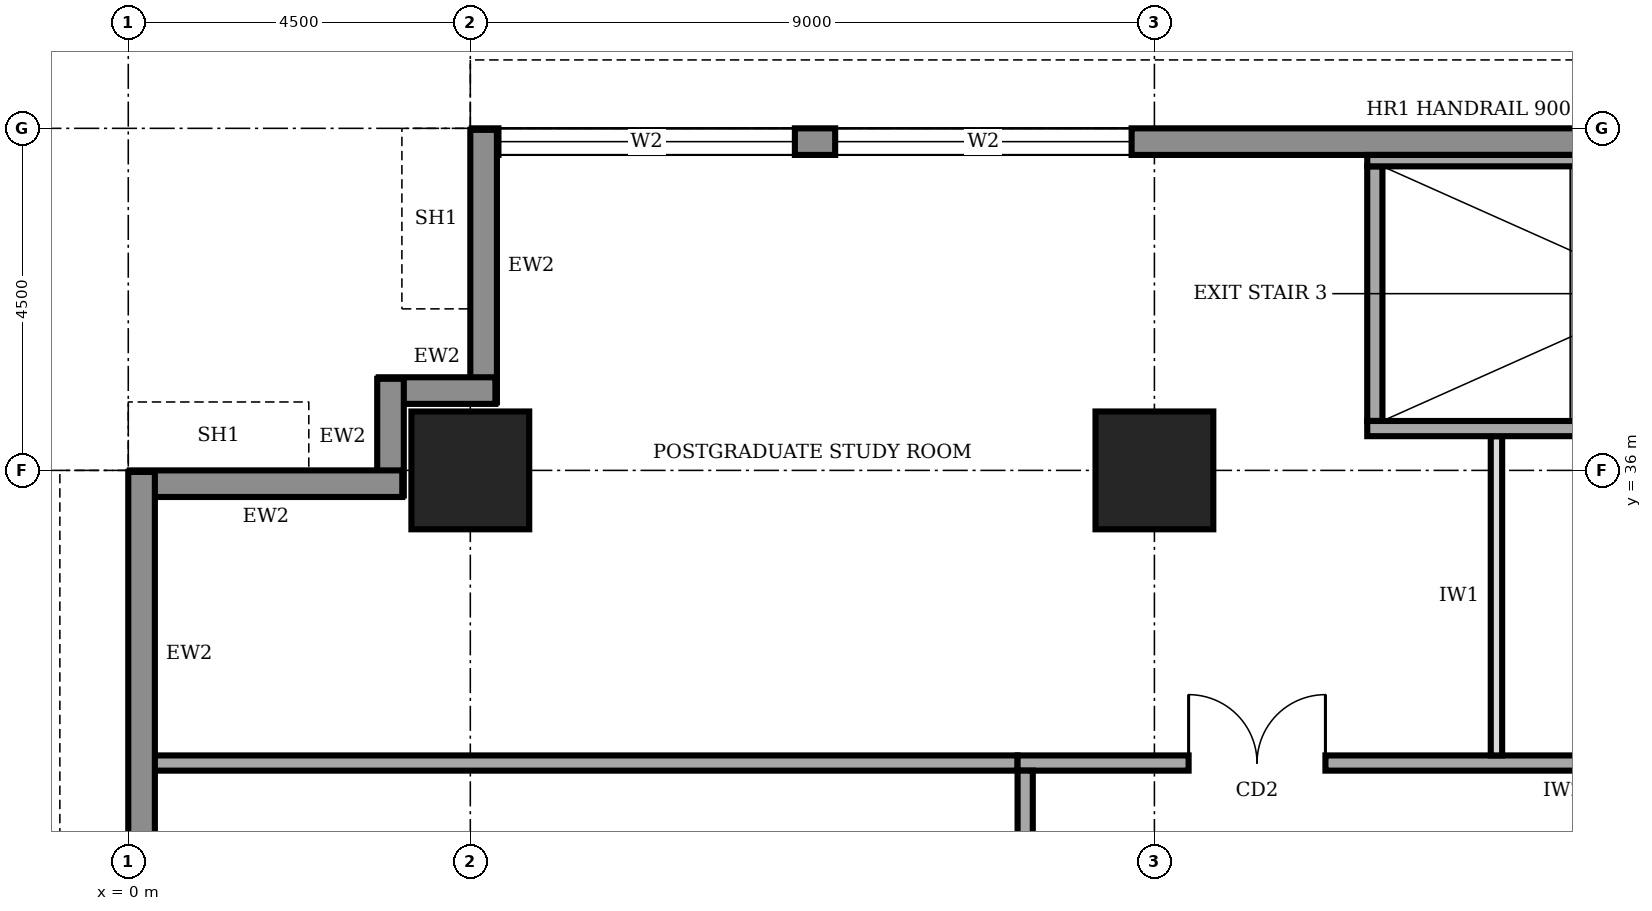
"""IFC4 building model, lengths in metres.
Left out: names, types, materials, properties, quantities, classifications, styles, units other than length and angle.
Written with IfcOpenShell. Run it as: python <this file> out.ifc"""

import sys

from ifc_helpers import new_model, si_unit, direction, frame, frame_2d, origin, origin_2d, place, context, subcontext, project, spatial, rectangle, extrude, element, fill, save


model = new_model("IFC4")
c1 = context("Model", 3, precision=1e-05, world=origin(), true_north=direction((0.0, 1.0)))
c2 = subcontext(c1, "Body", "Model", "MODEL_VIEW")
j1 = project(units=[si_unit("LENGTHUNIT", "METRE"), si_unit("PLANEANGLEUNIT", "RADIAN")], contexts=[c1])
p1 = place(None, origin())
s1 = spatial("IfcSite", under=j1, at=p1, CompositionType="ELEMENT")
p2 = place(p1, origin())
s2 = spatial("IfcBuilding", under=s1, at=p2, CompositionType="ELEMENT")
p3 = place(p2, frame((0.0, 0.0, 229.0)))
s3 = spatial("IfcBuildingStorey", under=s2, at=p3, CompositionType="ELEMENT", Elevation=229.0)
for number, where, z_axis, x_axis in (
    (1, (4.5, 36.0, 0.0), (0.0, 0.0, 1.0), (1.0, 0.0, 0.0)),
    (2, (13.5, 36.0, 0.0), (0.0, 0.0, 1.0), (1.0, 0.0, 0.0)),
):
    element("IfcColumn", number, at=place(p3, frame(where, z_axis=z_axis, x_axis=x_axis)), inside=s3, PredefinedType="COLUMN", context=c2, shape_type="SweptSolid", body=[
        extrude(rectangle(XDim=1.55, YDim=1.55, at=origin_2d()), origin(), (0.0, 0.0, 1.0), 4.0),
    ])
p4 = place(p3, frame((35.98, 40.325, 0.0), z_axis=(0.0, 0.0, 1.0), x_axis=(-1.0, 0.0, 0.0)))
e3 = element("IfcWall", 3, at=p4, inside=s3, PredefinedType="STANDARD", context=c2, shape_type="SweptSolid", body=[
    extrude(rectangle(XDim=31.46, YDim=0.35, at=frame_2d((15.73, 0.0))), origin(), (0.0, 0.0, 1.0), 3.75),
])
p5 = place(p4, frame((27.21, 0.0, 0.6)))
e4 = element("IfcOpeningElement", 4, at=p5, cuts=e3, PredefinedType="OPENING", context=c2, shape_type="SweptSolid", body=[
    extrude(rectangle(XDim=3.9, YDim=2.6, at=frame_2d((1.95, 1.3))), frame((0.0, 0.185, 0.0), z_axis=(0.0, -1.0, 0.0), x_axis=(1.0, 0.0, 0.0)), (0.0, 0.0, 1.0), 0.37),
])
p6 = place(p4, frame((22.78, 0.0, 0.6)))
e5 = element("IfcOpeningElement", 5, at=p6, cuts=e3, PredefinedType="OPENING", context=c2, shape_type="SweptSolid", body=[
    extrude(rectangle(XDim=3.9, YDim=2.6, at=frame_2d((1.95, 1.3))), frame((0.0, 0.185, 0.0), z_axis=(0.0, -1.0, 0.0), x_axis=(1.0, 0.0, 0.0)), (0.0, 0.0, 1.0), 0.37),
])
p7 = place(p4, frame((4.78, 0.0, 0.6)))
e6 = element("IfcOpeningElement", 6, at=p7, cuts=e3, PredefinedType="OPENING", context=c2, shape_type="SweptSolid", body=[
    extrude(rectangle(XDim=3.9, YDim=2.6, at=frame_2d((1.95, 1.3))), frame((0.0, 0.185, 0.0), z_axis=(0.0, -1.0, 0.0), x_axis=(1.0, 0.0, 0.0)), (0.0, 0.0, 1.0), 0.37),
])
p8 = place(p3, frame((4.675, 40.48, 0.0), z_axis=(0.0, 0.0, 1.0), x_axis=(0.0, -1.0, 0.0)))
e7 = element("IfcWall", 7, at=p8, inside=s3, PredefinedType="STANDARD", context=c2, shape_type="SweptSolid", body=[
    extrude(rectangle(XDim=3.585, YDim=0.35, at=frame_2d((1.792, 0.0))), origin(), (0.0, 0.0, 1.0), 2.85),
])
for number, where, z_axis, x_axis in (
    (8, (4.83, 37.05, 0.0), (0.0, 0.0, 1.0), (-1.0, 0.0, 0.0)),
    (9, (3.45, 37.205, 0.0), (0.0, 0.0, 1.0), (0.0, -1.0, 0.0)),
):
    element("IfcWall", number, at=place(p3, frame(where, z_axis=z_axis, x_axis=x_axis)), inside=s3, PredefinedType="STANDARD", context=c2, shape_type="SweptSolid", body=[
        extrude(rectangle(XDim=1.535, YDim=0.35, at=frame_2d((0.768, 0.0))), origin(), (0.0, 0.0, 1.0), 3.75),
    ])
p9 = place(p3, frame((3.605, 35.825, 0.0), z_axis=(0.0, 0.0, 1.0), x_axis=(-1.0, 0.0, 0.0)))
e10 = element("IfcWall", 10, at=p9, inside=s3, PredefinedType="STANDARD", context=c2, shape_type="SweptSolid", body=[
    extrude(rectangle(XDim=3.585, YDim=0.35, at=frame_2d((1.792, 0.0))), origin(), (0.0, 0.0, 1.0), 2.85),
])
p10 = place(p3, frame((0.175, 35.98, 0.0), z_axis=(0.0, 0.0, 1.0), x_axis=(0.0, -1.0, 0.0)))
e11 = element("IfcWall", 11, at=p10, inside=s3, PredefinedType="STANDARD", context=c2, shape_type="SweptSolid", body=[
    extrude(rectangle(XDim=31.46, YDim=0.35, at=frame_2d((15.73, 0.0))), origin(), (0.0, 0.0, 1.0), 3.75),
])
p11 = place(p10, frame((27.21, 0.0, 0.6)))
e12 = element("IfcOpeningElement", 12, at=p11, cuts=e11, PredefinedType="OPENING", context=c2, shape_type="SweptSolid", body=[
    extrude(rectangle(XDim=3.9, YDim=2.6, at=frame_2d((1.95, 1.3))), frame((0.0, 0.185, 0.0), z_axis=(0.0, -1.0, 0.0), x_axis=(1.0, 0.0, 0.0)), (0.0, 0.0, 1.0), 0.37),
])
p12 = place(p10, frame((22.78, 0.0, 0.6)))
e13 = element("IfcOpeningElement", 13, at=p12, cuts=e11, PredefinedType="OPENING", context=c2, shape_type="SweptSolid", body=[
    extrude(rectangle(XDim=3.9, YDim=2.6, at=frame_2d((1.95, 1.3))), frame((0.0, 0.185, 0.0), z_axis=(0.0, -1.0, 0.0), x_axis=(1.0, 0.0, 0.0)), (0.0, 0.0, 1.0), 0.37),
])
p13 = place(p10, frame((18.28, 0.0, 0.6)))
e14 = element("IfcOpeningElement", 14, at=p13, cuts=e11, PredefinedType="OPENING", context=c2, shape_type="SweptSolid", body=[
    extrude(rectangle(XDim=3.9, YDim=2.6, at=frame_2d((1.95, 1.3))), frame((0.0, 0.185, 0.0), z_axis=(0.0, -1.0, 0.0), x_axis=(1.0, 0.0, 0.0)), (0.0, 0.0, 1.0), 0.37),
])
p14 = place(p10, frame((13.78, 0.0, 0.6)))
e15 = element("IfcOpeningElement", 15, at=p14, cuts=e11, PredefinedType="OPENING", context=c2, shape_type="SweptSolid", body=[
    extrude(rectangle(XDim=3.9, YDim=2.6, at=frame_2d((1.95, 1.3))), frame((0.0, 0.185, 0.0), z_axis=(0.0, -1.0, 0.0), x_axis=(1.0, 0.0, 0.0)), (0.0, 0.0, 1.0), 0.37),
])
p15 = place(p10, frame((9.28, 0.0, 0.6)))
e16 = element("IfcOpeningElement", 16, at=p15, cuts=e11, PredefinedType="OPENING", context=c2, shape_type="SweptSolid", body=[
    extrude(rectangle(XDim=3.9, YDim=2.6, at=frame_2d((1.95, 1.3))), frame((0.0, 0.185, 0.0), z_axis=(0.0, -1.0, 0.0), x_axis=(1.0, 0.0, 0.0)), (0.0, 0.0, 1.0), 0.37),
])
p16 = place(p10, frame((4.78, 0.0, 0.6)))
e17 = element("IfcOpeningElement", 17, at=p16, cuts=e11, PredefinedType="OPENING", context=c2, shape_type="SweptSolid", body=[
    extrude(rectangle(XDim=3.9, YDim=2.6, at=frame_2d((1.95, 1.3))), frame((0.0, 0.185, 0.0), z_axis=(0.0, -1.0, 0.0), x_axis=(1.0, 0.0, 0.0)), (0.0, 0.0, 1.0), 0.37),
])
p17 = place(p3, frame((28.6, 32.15, 0.0), z_axis=(0.0, 0.0, 1.0), x_axis=(-1.0, 0.0, 0.0)))
e18 = element("IfcWall", 18, at=p17, inside=s3, PredefinedType="SOLIDWALL", context=c2, shape_type="SweptSolid", body=[
    extrude(rectangle(XDim=16.9, YDim=0.2, at=frame_2d((8.45, 0.0))), origin(), (0.0, 0.0, 1.0), 3.75),
])
p18 = place(p17, frame((12.85, 0.0, 0.0)))
e19 = element("IfcOpeningElement", 19, at=p18, cuts=e18, PredefinedType="OPENING", context=c2, shape_type="SweptSolid", body=[
    extrude(rectangle(XDim=1.8, YDim=2.1, at=frame_2d((0.9, 1.05))), frame((0.0, 0.11, 0.0), z_axis=(0.0, -1.0, 0.0), x_axis=(1.0, 0.0, 0.0)), (0.0, 0.0, 1.0), 0.22),
])
p19 = place(p17, frame((5.6, 0.0, 0.0)))
e20 = element("IfcOpeningElement", 20, at=p19, cuts=e18, PredefinedType="OPENING", context=c2, shape_type="SweptSolid", body=[
    extrude(rectangle(XDim=1.0, YDim=2.1, at=frame_2d((0.5, 1.05))), frame((0.0, 0.11, 0.0), z_axis=(0.0, -1.0, 0.0), x_axis=(1.0, 0.0, 0.0)), (0.0, 0.0, 1.0), 0.22),
])
p20 = place(p17, frame((0.275, 0.0, 0.0)))
e21 = element("IfcOpeningElement", 21, at=p20, cuts=e18, PredefinedType="OPENING", context=c2, shape_type="SweptSolid", body=[
    extrude(rectangle(XDim=1.0, YDim=2.1, at=frame_2d((0.5, 1.05))), frame((0.0, 0.11, 0.0), z_axis=(0.0, -1.0, 0.0), x_axis=(1.0, 0.0, 0.0)), (0.0, 0.0, 1.0), 0.22),
])
p21 = place(p3, frame((11.8, 32.05, 0.0), z_axis=(0.0, 0.0, 1.0), x_axis=(0.0, -1.0, 0.0)))
e22 = element("IfcWall", 22, at=p21, inside=s3, PredefinedType="SOLIDWALL", context=c2, shape_type="SweptSolid", body=[
    extrude(rectangle(XDim=23.05, YDim=0.2, at=frame_2d((11.525, 0.0))), origin(), (0.0, 0.0, 1.0), 3.75),
])
p22 = place(p21, frame((20.3, 0.0, 0.0)))
e23 = element("IfcOpeningElement", 23, at=p22, cuts=e22, PredefinedType="OPENING", context=c2, shape_type="SweptSolid", body=[
    extrude(rectangle(XDim=1.0, YDim=2.1, at=frame_2d((0.5, 1.05))), frame((0.0, 0.11, 0.0), z_axis=(0.0, -1.0, 0.0), x_axis=(1.0, 0.0, 0.0)), (0.0, 0.0, 1.0), 0.22),
])
p23 = place(p21, frame((16.95, 0.0, 0.0)))
e24 = element("IfcOpeningElement", 24, at=p23, cuts=e22, PredefinedType="OPENING", context=c2, shape_type="SweptSolid", body=[
    extrude(rectangle(XDim=1.0, YDim=2.1, at=frame_2d((0.5, 1.05))), frame((0.0, 0.11, 0.0), z_axis=(0.0, -1.0, 0.0), x_axis=(1.0, 0.0, 0.0)), (0.0, 0.0, 1.0), 0.22),
])
p24 = place(p21, frame((13.95, 0.0, 0.0)))
e25 = element("IfcOpeningElement", 25, at=p24, cuts=e22, PredefinedType="OPENING", context=c2, shape_type="SweptSolid", body=[
    extrude(rectangle(XDim=0.9, YDim=2.1, at=frame_2d((0.45, 1.05))), frame((0.0, 0.11, 0.0), z_axis=(0.0, -1.0, 0.0), x_axis=(1.0, 0.0, 0.0)), (0.0, 0.0, 1.0), 0.22),
])
p25 = place(p21, frame((10.9, 0.0, 0.0)))
e26 = element("IfcOpeningElement", 26, at=p25, cuts=e22, PredefinedType="OPENING", context=c2, shape_type="SweptSolid", body=[
    extrude(rectangle(XDim=0.9, YDim=2.1, at=frame_2d((0.45, 1.05))), frame((0.0, 0.11, 0.0), z_axis=(0.0, -1.0, 0.0), x_axis=(1.0, 0.0, 0.0)), (0.0, 0.0, 1.0), 0.22),
])
p26 = place(p21, frame((6.2, 0.0, 0.0)))
e27 = element("IfcOpeningElement", 27, at=p26, cuts=e22, PredefinedType="OPENING", context=c2, shape_type="SweptSolid", body=[
    extrude(rectangle(XDim=0.9, YDim=2.1, at=frame_2d((0.45, 1.05))), frame((0.0, 0.11, 0.0), z_axis=(0.0, -1.0, 0.0), x_axis=(1.0, 0.0, 0.0)), (0.0, 0.0, 1.0), 0.22),
])
p27 = place(p21, frame((8.75, 0.0, 0.0)))
e28 = element("IfcOpeningElement", 28, at=p27, cuts=e22, PredefinedType="OPENING", context=c2, shape_type="SweptSolid", body=[
    extrude(rectangle(XDim=1.0, YDim=2.1, at=frame_2d((0.5, 1.05))), frame((0.0, 0.11, 0.0), z_axis=(0.0, -1.0, 0.0), x_axis=(1.0, 0.0, 0.0)), (0.0, 0.0, 1.0), 0.22),
])
p28 = place(p21, frame((1.925, 0.0, 0.0)))
e29 = element("IfcOpeningElement", 29, at=p28, cuts=e22, PredefinedType="OPENING", context=c2, shape_type="SweptSolid", body=[
    extrude(rectangle(XDim=1.0, YDim=2.1, at=frame_2d((0.5, 1.05))), frame((0.0, 0.11, 0.0), z_axis=(0.0, -1.0, 0.0), x_axis=(1.0, 0.0, 0.0)), (0.0, 0.0, 1.0), 0.22),
])
p29 = place(p3, frame((0.3, 32.15, 0.0), z_axis=(0.0, 0.0, 1.0), x_axis=(1.0, 0.0, 0.0)))
e30 = element("IfcWall", 30, at=p29, inside=s3, PredefinedType="SOLIDWALL", context=c2, shape_type="SweptSolid", body=[
    extrude(rectangle(XDim=11.4, YDim=0.2, at=frame_2d((5.7, 0.0))), origin(), (0.0, 0.0, 1.0), 3.75),
])
p30 = place(p3, frame((18.0, 32.25, 0.0), z_axis=(0.0, 0.0, 1.0), x_axis=(0.0, 1.0, 0.0)))
e31 = element("IfcWall", 31, at=p30, inside=s3, PredefinedType="PARTITIONING", context=c2, shape_type="SweptSolid", body=[
    extrude(rectangle(XDim=4.2, YDim=0.15, at=frame_2d((2.1, 0.0))), origin(), (0.0, 0.0, 1.0), 3.75),
])
p31 = place(p3, frame((16.3, 36.55, 0.0), z_axis=(0.0, 0.0, 1.0), x_axis=(1.0, 0.0, 0.0)))
e32 = element("IfcWall", 32, at=p31, inside=s3, PredefinedType="SOLIDWALL", context=c2, shape_type="SweptSolid", body=[
    extrude(rectangle(XDim=7.9, YDim=0.2, at=frame_2d((3.95, 0.0))), origin(), (0.0, 0.0, 1.0), 3.75),
])
p32 = place(p31, frame((6.3, 0.0, 0.0)))
e33 = element("IfcOpeningElement", 33, at=p32, cuts=e32, PredefinedType="OPENING", context=c2, shape_type="SweptSolid", body=[
    extrude(rectangle(XDim=1.0, YDim=2.1, at=frame_2d((0.5, 1.05))), frame((0.0, 0.11, 0.0), z_axis=(0.0, -1.0, 0.0), x_axis=(1.0, 0.0, 0.0)), (0.0, 0.0, 1.0), 0.22),
])
p33 = place(p3, frame((16.3, 40.075, 0.0), z_axis=(0.0, 0.0, 1.0), x_axis=(1.0, 0.0, 0.0)))
e34 = element("IfcWall", 34, at=p33, inside=s3, PredefinedType="SOLIDWALL", context=c2, shape_type="SweptSolid", body=[
    extrude(rectangle(XDim=7.9, YDim=0.15, at=frame_2d((3.95, 0.0))), origin(), (0.0, 0.0, 1.0), 3.75),
])
p34 = place(p3, frame((16.4, 36.65, 0.0), z_axis=(0.0, 0.0, 1.0), x_axis=(0.0, 1.0, 0.0)))
e35 = element("IfcWall", 35, at=p34, inside=s3, PredefinedType="SOLIDWALL", context=c2, shape_type="SweptSolid", body=[
    extrude(rectangle(XDim=3.35, YDim=0.2, at=frame_2d((1.675, 0.0))), origin(), (0.0, 0.0, 1.0), 3.75),
])
p35 = place(p5, origin())
e36 = element("IfcWindow", 36, at=p35, inside=s3, PartitioningType="SINGLE_PANEL", PredefinedType="WINDOW", context=c2, shape_type="SweptSolid", body=[
    extrude(rectangle(XDim=3.9, YDim=2.6, at=frame_2d((1.95, 1.3))), frame((0.0, 0.03, 0.0), z_axis=(0.0, -1.0, 0.0), x_axis=(1.0, 0.0, 0.0)), (0.0, 0.0, 1.0), 0.06),
])
fill(e4, e36)
p36 = place(p6, origin())
e37 = element("IfcWindow", 37, at=p36, inside=s3, PartitioningType="SINGLE_PANEL", PredefinedType="WINDOW", context=c2, shape_type="SweptSolid", body=[
    extrude(rectangle(XDim=3.9, YDim=2.6, at=frame_2d((1.95, 1.3))), frame((0.0, 0.03, 0.0), z_axis=(0.0, -1.0, 0.0), x_axis=(1.0, 0.0, 0.0)), (0.0, 0.0, 1.0), 0.06),
])
fill(e5, e37)
p37 = place(p18, frame((1.8, 0.0, 0.0), z_axis=(0.0, 0.0, 1.0), x_axis=(-1.0, 0.0, 0.0)))
e38 = element("IfcDoor", 38, at=p37, inside=s3, OperationType="DOUBLE_DOOR_SINGLE_SWING", PredefinedType="DOOR", context=c2, shape_type="SweptSolid", body=[
    extrude(rectangle(XDim=1.8, YDim=2.1, at=frame_2d((0.9, 1.05))), frame((0.0, 0.025, 0.0), z_axis=(0.0, -1.0, 0.0), x_axis=(1.0, 0.0, 0.0)), (0.0, 0.0, 1.0), 0.05),
])
fill(e19, e38)
save(model, sys.argv[1])
